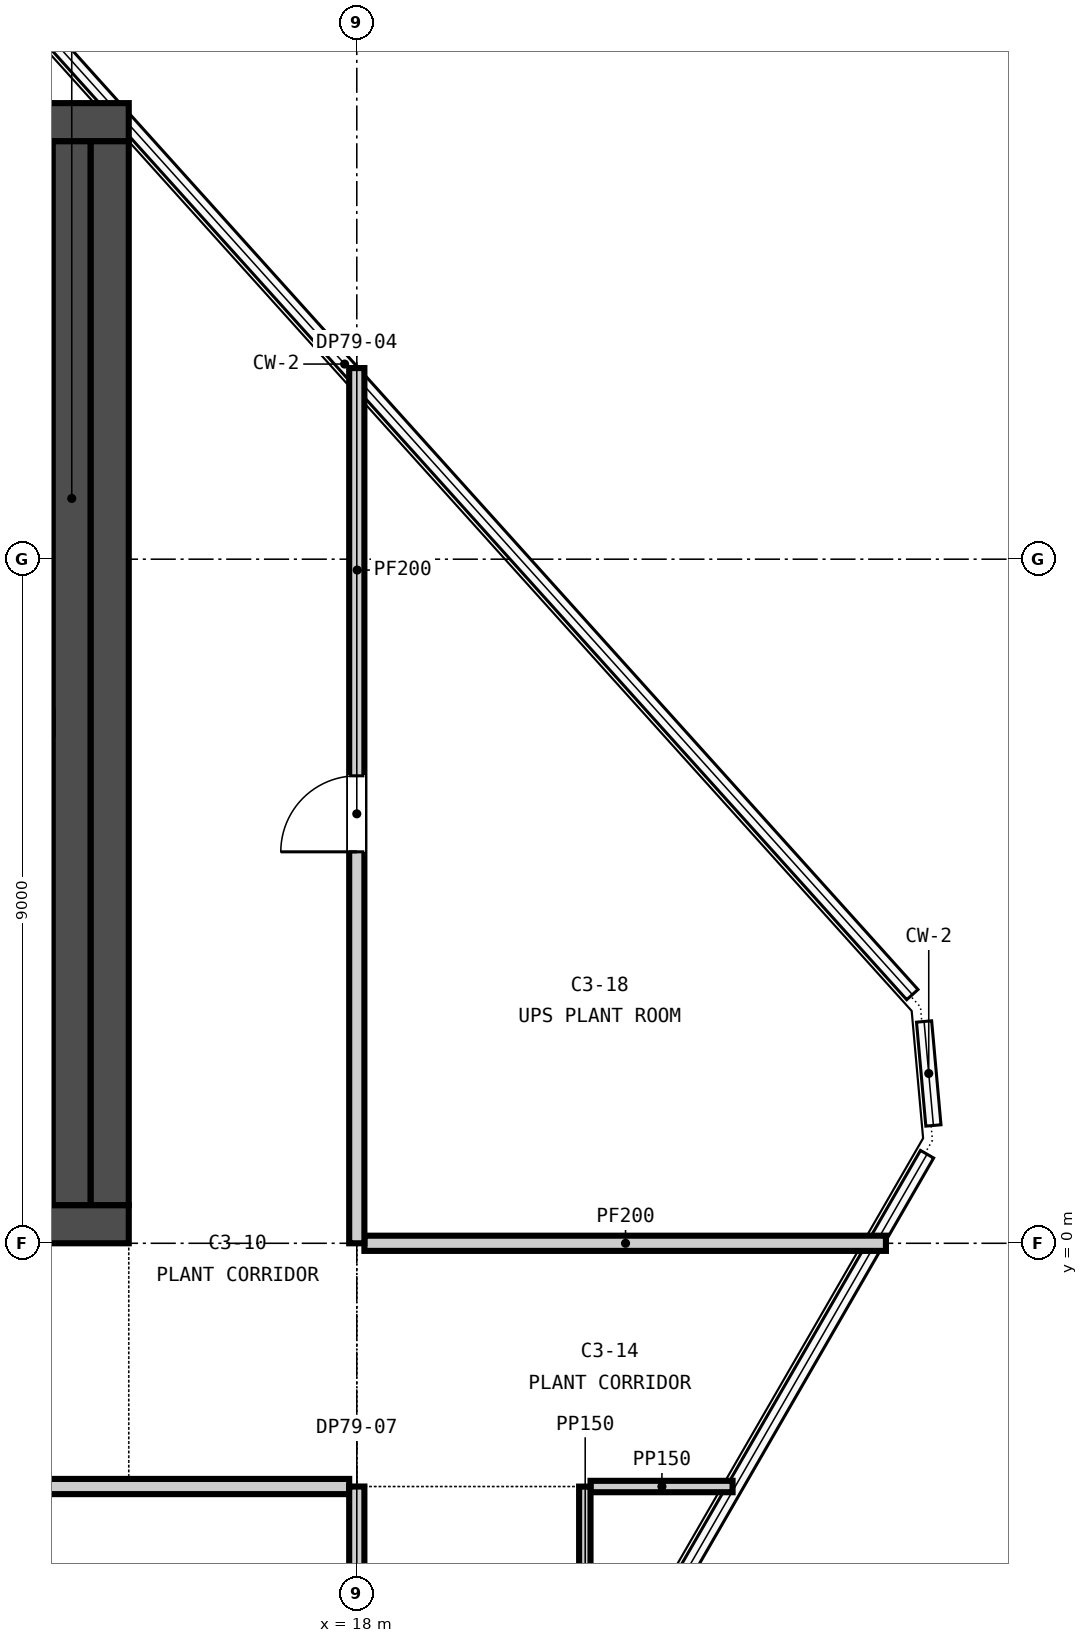
"""IFC4 building model, lengths in metres.
Left out: names, types, materials, properties, quantities, classifications, styles, units other than length and angle.
Written with IfcOpenShell. Run it as: python <this file> out.ifc"""

import sys

from ifc_helpers import new_model, si_unit, direction, frame, frame_2d, origin, place, context, subcontext, project, spatial, rectangle, extrude, element, fill, save


model = new_model("IFC4")
c1 = context("Model", 3, precision=1e-05, world=origin(), true_north=direction((0.0, 1.0)))
c2 = subcontext(c1, "Body", "Model", "MODEL_VIEW")
j1 = project(units=[si_unit("LENGTHUNIT", "METRE"), si_unit("PLANEANGLEUNIT", "RADIAN")], contexts=[c1])
p1 = place(None, origin())
s1 = spatial("IfcSite", under=j1, at=p1, CompositionType="ELEMENT")
p2 = place(p1, origin())
s2 = spatial("IfcBuilding", under=s1, at=p2, CompositionType="ELEMENT")
p3 = place(p2, frame((0.0, 0.0, 311.1)))
s3 = spatial("IfcBuildingStorey", under=s2, at=p3, CompositionType="ELEMENT", Elevation=311.1)
p4 = place(p3, frame((-15.0, 0.25, -0.25), z_axis=(0.0, 0.0, 1.0), x_axis=(1.0, 0.0, 0.0)))
e1 = element("IfcWall", 1, at=p4, inside=s3, PredefinedType="SOLIDWALL", context=c2, shape_type="SweptSolid", body=[
    extrude(rectangle(XDim=30.0, YDim=0.5, at=frame_2d((15.0, 0.0))), origin(), (0.0, 0.0, 1.0), 4.5),
])
p5 = place(p3, frame((-15.0, 14.75, -0.25), z_axis=(0.0, 0.0, 1.0), x_axis=(1.0, 0.0, 0.0)))
e2 = element("IfcWall", 2, at=p5, inside=s3, PredefinedType="SOLIDWALL", context=c2, shape_type="SweptSolid", body=[
    extrude(rectangle(XDim=30.0, YDim=0.5, at=frame_2d((15.0, 0.0))), origin(), (0.0, 0.0, 1.0), 4.5),
])
p6 = place(p5, frame((1.5, 0.0, 0.25)))
e3 = element("IfcOpeningElement", 3, at=p6, cuts=e2, PredefinedType="OPENING", context=c2, shape_type="SweptSolid", body=[
    extrude(rectangle(XDim=1.2, YDim=2.1, at=frame_2d((0.6, 1.05))), frame((0.0, 0.26, 0.0), z_axis=(0.0, -1.0, 0.0), x_axis=(1.0, 0.0, 0.0)), (0.0, 0.0, 1.0), 0.52),
])
p7 = place(p5, frame((27.3, 0.0, 0.25)))
e4 = element("IfcOpeningElement", 4, at=p7, cuts=e2, PredefinedType="OPENING", context=c2, shape_type="SweptSolid", body=[
    extrude(rectangle(XDim=1.2, YDim=2.1, at=frame_2d((0.6, 1.05))), frame((0.0, 0.26, 0.0), z_axis=(0.0, -1.0, 0.0), x_axis=(1.0, 0.0, 0.0)), (0.0, 0.0, 1.0), 0.52),
])
p8 = place(p5, frame((9.25, 0.0, 0.25)))
e5 = element("IfcOpeningElement", 5, at=p8, cuts=e2, PredefinedType="OPENING", context=c2, shape_type="SweptSolid", body=[
    extrude(rectangle(XDim=1.5, YDim=2.1, at=frame_2d((0.75, 1.05))), frame((0.0, 0.26, 0.0), z_axis=(0.0, -1.0, 0.0), x_axis=(1.0, 0.0, 0.0)), (0.0, 0.0, 1.0), 0.52),
])
p9 = place(p3, frame((14.75, 0.5, -0.25), z_axis=(0.0, 0.0, 1.0), x_axis=(0.0, 1.0, 0.0)))
e6 = element("IfcWall", 6, at=p9, inside=s3, PredefinedType="SOLIDWALL", context=c2, shape_type="SweptSolid", body=[
    extrude(rectangle(XDim=14.0, YDim=0.5, at=frame_2d((7.0, 0.0))), origin(), (0.0, 0.0, 1.0), 4.5),
])
p10 = place(p3, frame((11.05, 6.85, 0.0), z_axis=(0.0, 0.0, 1.0), x_axis=(1.0, 0.0, 0.0)))
e7 = element("IfcWall", 7, at=p10, inside=s3, PredefinedType="SOLIDWALL", context=c2, shape_type="SweptSolid", body=[
    extrude(rectangle(XDim=2.95, YDim=0.3, at=frame_2d((1.475, 0.0))), origin(), (0.0, 0.0, 1.0), 4.25),
])
p11 = place(p3, frame((14.25, 0.5, 0.0), z_axis=(0.0, 0.0, 1.0), x_axis=(0.0, 1.0, 0.0)))
e8 = element("IfcWall", 8, at=p11, inside=s3, PredefinedType="SOLIDWALL", context=c2, shape_type="SweptSolid", body=[
    extrude(rectangle(XDim=14.0, YDim=0.5, at=frame_2d((7.0, 0.0))), origin(), (0.0, 0.0, 1.0), 4.25),
])
p12 = place(p3, frame((9.1, -3.2, 0.0), z_axis=(0.0, 0.0, 1.0), x_axis=(1.0, 0.0, 0.0)))
e9 = element("IfcWall", 9, at=p12, inside=s3, PredefinedType="PARTITIONING", context=c2, shape_type="SweptSolid", body=[
    extrude(rectangle(XDim=8.8, YDim=0.2, at=frame_2d((4.4, 0.0))), origin(), (0.0, 0.0, 1.0), 4.25),
])
p13 = place(p3, frame((21.075, -3.2, 0.0), z_axis=(0.0, 0.0, 1.0), x_axis=(1.0, 0.0, 0.0)))
e10 = element("IfcWall", 10, at=p13, inside=s3, PredefinedType="PARTITIONING", context=c2, shape_type="SweptSolid", body=[
    extrude(rectangle(XDim=1.869, YDim=0.15, at=frame_2d((0.935, 0.0))), origin(), (0.0, 0.0, 1.0), 4.25),
])
p14 = place(p3, frame((18.1, 0.0, 0.0), z_axis=(0.0, 0.0, 1.0), x_axis=(1.0, 0.0, 0.0)))
e11 = element("IfcWall", 11, at=p14, inside=s3, PredefinedType="PARTITIONING", context=c2, shape_type="SweptSolid", body=[
    extrude(rectangle(XDim=6.861, YDim=0.2, at=frame_2d((3.431, 0.0))), origin(), (0.0, 0.0, 1.0), 4.25),
])
p15 = place(p3, frame((18.0, -10.933, 0.0), z_axis=(0.0, 0.0, 1.0), x_axis=(0.0, 1.0, 0.0)))
e12 = element("IfcWall", 12, at=p15, inside=s3, PredefinedType="PARTITIONING", context=c2, shape_type="SweptSolid", body=[
    extrude(rectangle(XDim=7.733, YDim=0.2, at=frame_2d((3.867, 0.0))), origin(), (0.0, 0.0, 1.0), 4.25),
])
p16 = place(p15, frame((3.4, 0.0, 0.0)))
e13 = element("IfcOpeningElement", 13, at=p16, cuts=e12, PredefinedType="OPENING", context=c2, shape_type="SweptSolid", body=[
    extrude(rectangle(XDim=1.0, YDim=2.1, at=frame_2d((0.5, 1.05))), frame((0.0, 0.11, 0.0), z_axis=(0.0, -1.0, 0.0), x_axis=(1.0, 0.0, 0.0)), (0.0, 0.0, 1.0), 0.22),
])
p17 = place(p3, frame((18.0, 0.0, 0.0), z_axis=(0.0, 0.0, 1.0), x_axis=(0.0, 1.0, 0.0)))
e14 = element("IfcWall", 14, at=p17, inside=s3, PredefinedType="PARTITIONING", context=c2, shape_type="SweptSolid", body=[
    extrude(rectangle(XDim=11.514, YDim=0.2, at=frame_2d((5.757, 0.0))), origin(), (0.0, 0.0, 1.0), 4.25),
])
p18 = place(p17, frame((5.15, 0.0, 0.0)))
e15 = element("IfcOpeningElement", 15, at=p18, cuts=e14, PredefinedType="OPENING", context=c2, shape_type="SweptSolid", body=[
    extrude(rectangle(XDim=1.0, YDim=2.1, at=frame_2d((0.5, 1.05))), frame((0.0, 0.11, 0.0), z_axis=(0.0, -1.0, 0.0), x_axis=(1.0, 0.0, 0.0)), (0.0, 0.0, 1.0), 0.22),
])
p19 = place(p3, frame((21.0, -6.567, 0.0), z_axis=(0.0, 0.0, 1.0), x_axis=(0.0, 1.0, 0.0)))
e16 = element("IfcWall", 16, at=p19, inside=s3, PredefinedType="PARTITIONING", context=c2, shape_type="SweptSolid", body=[
    extrude(rectangle(XDim=3.366, YDim=0.15, at=frame_2d((1.683, 0.0))), origin(), (0.0, 0.0, 1.0), 4.25),
])
p20 = place(p18, origin())
e17 = element("IfcDoor", 17, at=p20, inside=s3, OperationType="SINGLE_SWING_LEFT", PredefinedType="DOOR", context=c2, shape_type="SweptSolid", body=[
    extrude(rectangle(XDim=1.0, YDim=2.1, at=frame_2d((0.5, 1.05))), frame((0.0, 0.025, 0.0), z_axis=(0.0, -1.0, 0.0), x_axis=(1.0, 0.0, 0.0)), (0.0, 0.0, 1.0), 0.05),
])
fill(e15, e17)
save(model, sys.argv[1])
